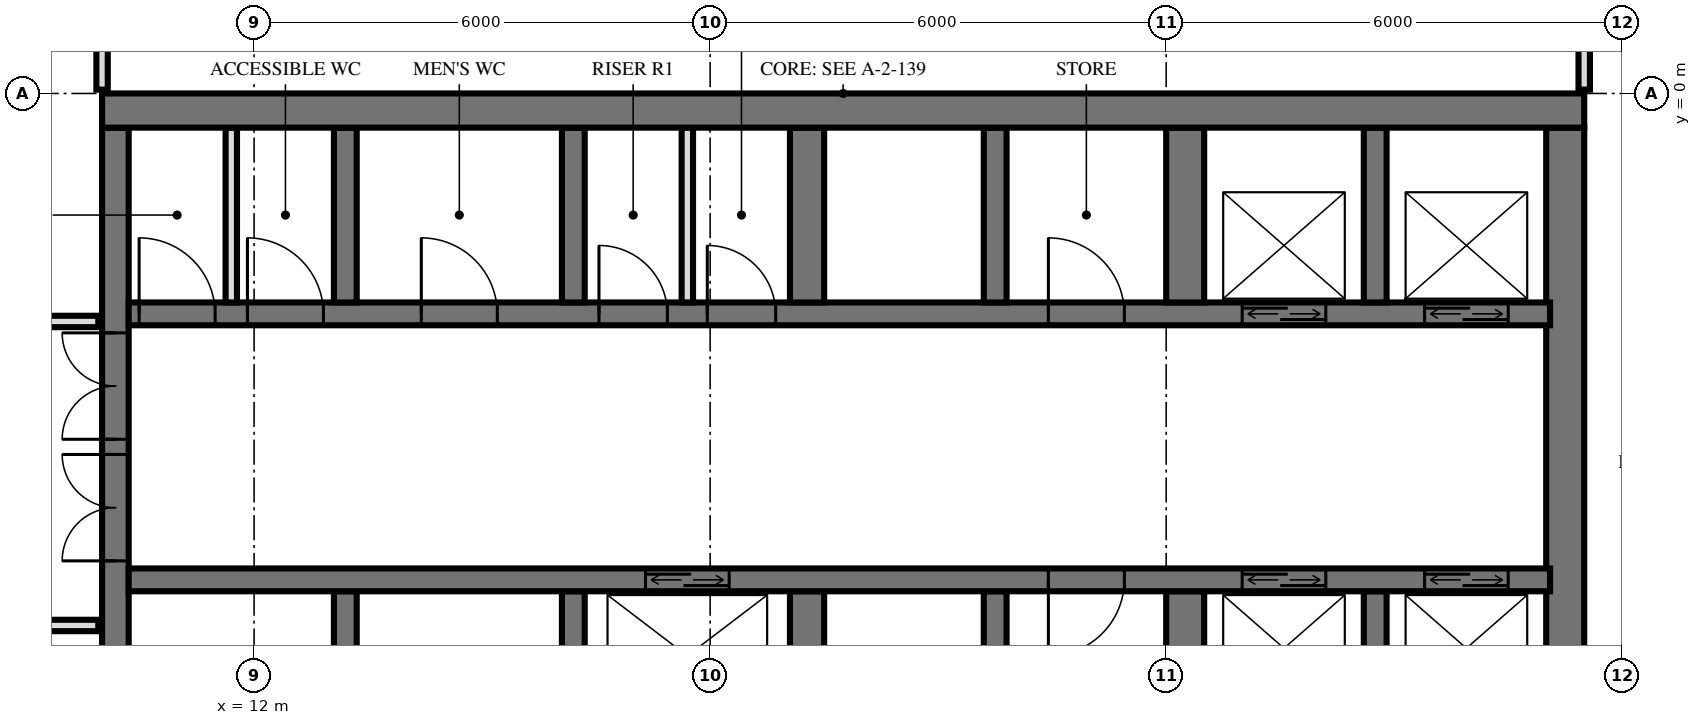
"""IFC4 building model, lengths in metres.
Left out: names, types, materials, properties, quantities, classifications, styles, units other than length and angle.
Written with IfcOpenShell. Run it as: python <this file> out.ifc"""

import sys

from ifc_helpers import new_model, si_unit, direction, frame, frame_2d, origin, place, context, subcontext, project, spatial, rectangle, extrude, element, fill, save


model = new_model("IFC4")
c1 = context("Model", 3, precision=1e-05, world=origin(), true_north=direction((0.0, 1.0)))
c2 = subcontext(c1, "Body", "Model", "MODEL_VIEW")
j1 = project(units=[si_unit("LENGTHUNIT", "METRE"), si_unit("PLANEANGLEUNIT", "RADIAN")], contexts=[c1])
p1 = place(None, origin())
s1 = spatial("IfcSite", under=j1, at=p1, CompositionType="ELEMENT")
p2 = place(p1, origin())
s2 = spatial("IfcBuilding", under=s1, at=p2, CompositionType="ELEMENT")
p3 = place(p2, frame((0.0, 0.0, 63.6)))
s3 = spatial("IfcBuildingStorey", under=s2, at=p3, CompositionType="ELEMENT", Elevation=63.6)
p4 = place(p3, frame((10.0, -0.225, 0.0), z_axis=(0.0, 0.0, 1.0), x_axis=(1.0, 0.0, 0.0)))
e1 = element("IfcWall", 1, at=p4, inside=s3, PredefinedType="SHEAR", context=c2, shape_type="SweptSolid", body=[
    extrude(rectangle(XDim=19.5, YDim=0.45, at=frame_2d((9.75, 0.0))), origin(), (0.0, 0.0, 1.0), 3.6),
])
p5 = place(p3, frame((10.175, -14.55, 0.0), z_axis=(0.0, 0.0, 1.0), x_axis=(0.0, 1.0, 0.0)))
e2 = element("IfcWall", 2, at=p5, inside=s3, PredefinedType="SHEAR", context=c2, shape_type="SweptSolid", body=[
    extrude(rectangle(XDim=14.1, YDim=0.35, at=frame_2d((7.05, 0.0))), origin(), (0.0, 0.0, 1.0), 3.6),
])
p6 = place(p5, frame((8.4, 0.0, 0.0)))
e3 = element("IfcOpeningElement", 3, at=p6, cuts=e2, PredefinedType="OPENING", context=c2, shape_type="SweptSolid", body=[
    extrude(rectangle(XDim=1.4, YDim=2.4, at=frame_2d((0.7, 1.2))), frame((0.0, 0.185, 0.0), z_axis=(0.0, -1.0, 0.0), x_axis=(1.0, 0.0, 0.0)), (0.0, 0.0, 1.0), 0.37),
])
p7 = place(p5, frame((10.0, 0.0, 0.0)))
e4 = element("IfcOpeningElement", 4, at=p7, cuts=e2, PredefinedType="OPENING", context=c2, shape_type="SweptSolid", body=[
    extrude(rectangle(XDim=1.4, YDim=2.4, at=frame_2d((0.7, 1.2))), frame((0.0, 0.185, 0.0), z_axis=(0.0, -1.0, 0.0), x_axis=(1.0, 0.0, 0.0)), (0.0, 0.0, 1.0), 0.37),
])
p8 = place(p5, frame((4.0, 0.0, 0.0)))
e5 = element("IfcOpeningElement", 5, at=p8, cuts=e2, PredefinedType="OPENING", context=c2, shape_type="SweptSolid", body=[
    extrude(rectangle(XDim=1.2, YDim=2.1, at=frame_2d((0.6, 1.05))), frame((0.0, 0.185, 0.0), z_axis=(0.0, -1.0, 0.0), x_axis=(1.0, 0.0, 0.0)), (0.0, 0.0, 1.0), 0.37),
])
p9 = place(p3, frame((29.25, -14.55, 0.0), z_axis=(0.0, 0.0, 1.0), x_axis=(0.0, 1.0, 0.0)))
e6 = element("IfcWall", 6, at=p9, inside=s3, PredefinedType="SHEAR", context=c2, shape_type="SweptSolid", body=[
    extrude(rectangle(XDim=14.1, YDim=0.5, at=frame_2d((7.05, 0.0))), origin(), (0.0, 0.0, 1.0), 3.6),
])
p10 = place(p3, frame((10.35, -2.9, 0.0), z_axis=(0.0, 0.0, 1.0), x_axis=(1.0, 0.0, 0.0)))
e7 = element("IfcWall", 7, at=p10, inside=s3, PredefinedType="SHEAR", context=c2, shape_type="SweptSolid", body=[
    extrude(rectangle(XDim=18.7, YDim=0.3, at=frame_2d((9.35, 0.0))), origin(), (0.0, 0.0, 1.0), 3.6),
])
p11 = place(p10, frame((14.65, 0.0, 0.0)))
e8 = element("IfcOpeningElement", 8, at=p11, cuts=e7, PredefinedType="OPENING", context=c2, shape_type="SweptSolid", body=[
    extrude(rectangle(XDim=1.1, YDim=2.1, at=frame_2d((0.55, 1.05))), frame((0.0, 0.16, 0.0), z_axis=(0.0, -1.0, 0.0), x_axis=(1.0, 0.0, 0.0)), (0.0, 0.0, 1.0), 0.32),
])
p12 = place(p10, frame((17.05, 0.0, 0.0)))
e9 = element("IfcOpeningElement", 9, at=p12, cuts=e7, PredefinedType="OPENING", context=c2, shape_type="SweptSolid", body=[
    extrude(rectangle(XDim=1.1, YDim=2.1, at=frame_2d((0.55, 1.05))), frame((0.0, 0.16, 0.0), z_axis=(0.0, -1.0, 0.0), x_axis=(1.0, 0.0, 0.0)), (0.0, 0.0, 1.0), 0.32),
])
p13 = place(p10, frame((6.188, 0.0, 0.0)))
e10 = element("IfcOpeningElement", 10, at=p13, cuts=e7, PredefinedType="OPENING", context=c2, shape_type="SweptSolid", body=[
    extrude(rectangle(XDim=0.9, YDim=2.1, at=frame_2d((0.45, 1.05))), frame((0.0, 0.16, 0.0), z_axis=(0.0, -1.0, 0.0), x_axis=(1.0, 0.0, 0.0)), (0.0, 0.0, 1.0), 0.32),
])
p14 = place(p10, frame((7.613, 0.0, 0.0)))
e11 = element("IfcOpeningElement", 11, at=p14, cuts=e7, PredefinedType="OPENING", context=c2, shape_type="SweptSolid", body=[
    extrude(rectangle(XDim=0.9, YDim=2.1, at=frame_2d((0.45, 1.05))), frame((0.0, 0.16, 0.0), z_axis=(0.0, -1.0, 0.0), x_axis=(1.0, 0.0, 0.0)), (0.0, 0.0, 1.0), 0.32),
])
p15 = place(p10, frame((0.137, 0.0, 0.0)))
e12 = element("IfcOpeningElement", 12, at=p15, cuts=e7, PredefinedType="OPENING", context=c2, shape_type="SweptSolid", body=[
    extrude(rectangle(XDim=1.0, YDim=2.1, at=frame_2d((0.5, 1.05))), frame((0.0, 0.16, 0.0), z_axis=(0.0, -1.0, 0.0), x_axis=(1.0, 0.0, 0.0)), (0.0, 0.0, 1.0), 0.32),
])
p16 = place(p10, frame((1.562, 0.0, 0.0)))
e13 = element("IfcOpeningElement", 13, at=p16, cuts=e7, PredefinedType="OPENING", context=c2, shape_type="SweptSolid", body=[
    extrude(rectangle(XDim=1.0, YDim=2.1, at=frame_2d((0.5, 1.05))), frame((0.0, 0.16, 0.0), z_axis=(0.0, -1.0, 0.0), x_axis=(1.0, 0.0, 0.0)), (0.0, 0.0, 1.0), 0.32),
])
p17 = place(p10, frame((3.85, 0.0, 0.0)))
e14 = element("IfcOpeningElement", 14, at=p17, cuts=e7, PredefinedType="OPENING", context=c2, shape_type="SweptSolid", body=[
    extrude(rectangle(XDim=1.0, YDim=2.1, at=frame_2d((0.5, 1.05))), frame((0.0, 0.16, 0.0), z_axis=(0.0, -1.0, 0.0), x_axis=(1.0, 0.0, 0.0)), (0.0, 0.0, 1.0), 0.32),
])
p18 = place(p10, frame((12.1, 0.0, 0.0)))
e15 = element("IfcOpeningElement", 15, at=p18, cuts=e7, PredefinedType="OPENING", context=c2, shape_type="SweptSolid", body=[
    extrude(rectangle(XDim=1.0, YDim=2.1, at=frame_2d((0.5, 1.05))), frame((0.0, 0.16, 0.0), z_axis=(0.0, -1.0, 0.0), x_axis=(1.0, 0.0, 0.0)), (0.0, 0.0, 1.0), 0.32),
])
p19 = place(p3, frame((10.35, -6.4, 0.0), z_axis=(0.0, 0.0, 1.0), x_axis=(1.0, 0.0, 0.0)))
e16 = element("IfcWall", 16, at=p19, inside=s3, PredefinedType="SHEAR", context=c2, shape_type="SweptSolid", body=[
    extrude(rectangle(XDim=18.7, YDim=0.3, at=frame_2d((9.35, 0.0))), origin(), (0.0, 0.0, 1.0), 3.6),
])
p20 = place(p19, frame((14.65, 0.0, 0.0)))
e17 = element("IfcOpeningElement", 17, at=p20, cuts=e16, PredefinedType="OPENING", context=c2, shape_type="SweptSolid", body=[
    extrude(rectangle(XDim=1.1, YDim=2.1, at=frame_2d((0.55, 1.05))), frame((0.0, 0.16, 0.0), z_axis=(0.0, -1.0, 0.0), x_axis=(1.0, 0.0, 0.0)), (0.0, 0.0, 1.0), 0.32),
])
p21 = place(p19, frame((17.05, 0.0, 0.0)))
e18 = element("IfcOpeningElement", 18, at=p21, cuts=e16, PredefinedType="OPENING", context=c2, shape_type="SweptSolid", body=[
    extrude(rectangle(XDim=1.1, YDim=2.1, at=frame_2d((0.55, 1.05))), frame((0.0, 0.16, 0.0), z_axis=(0.0, -1.0, 0.0), x_axis=(1.0, 0.0, 0.0)), (0.0, 0.0, 1.0), 0.32),
])
p22 = place(p19, frame((6.8, 0.0, 0.0)))
e19 = element("IfcOpeningElement", 19, at=p22, cuts=e16, PredefinedType="OPENING", context=c2, shape_type="SweptSolid", body=[
    extrude(rectangle(XDim=1.1, YDim=2.1, at=frame_2d((0.55, 1.05))), frame((0.0, 0.16, 0.0), z_axis=(0.0, -1.0, 0.0), x_axis=(1.0, 0.0, 0.0)), (0.0, 0.0, 1.0), 0.32),
])
p23 = place(p19, frame((12.1, 0.0, 0.0)))
e20 = element("IfcOpeningElement", 20, at=p23, cuts=e16, PredefinedType="OPENING", context=c2, shape_type="SweptSolid", body=[
    extrude(rectangle(XDim=1.0, YDim=2.1, at=frame_2d((0.5, 1.05))), frame((0.0, 0.16, 0.0), z_axis=(0.0, -1.0, 0.0), x_axis=(1.0, 0.0, 0.0)), (0.0, 0.0, 1.0), 0.32),
])
for number, where, z_axis, x_axis in (
    (21, (13.2, -2.75, 0.0), (0.0, 0.0, 1.0), (0.0, 1.0, 0.0)),
    (22, (13.2, -8.85, 0.0), (0.0, 0.0, 1.0), (0.0, 1.0, 0.0)),
    (23, (16.2, -2.75, 0.0), (0.0, 0.0, 1.0), (0.0, 1.0, 0.0)),
    (24, (16.2, -8.85, 0.0), (0.0, 0.0, 1.0), (0.0, 1.0, 0.0)),
):
    element("IfcWall", number, at=place(p3, frame(where, z_axis=z_axis, x_axis=x_axis)), inside=s3, PredefinedType="SHEAR", context=c2, shape_type="SweptSolid", body=[
        extrude(rectangle(XDim=2.3, YDim=0.3, at=frame_2d((1.15, 0.0))), origin(), (0.0, 0.0, 1.0), 3.6),
    ])
for number, where, z_axis, x_axis in (
    (25, (19.275, -2.75, 0.0), (0.0, 0.0, 1.0), (0.0, 1.0, 0.0)),
    (26, (19.275, -8.85, 0.0), (0.0, 0.0, 1.0), (0.0, 1.0, 0.0)),
):
    element("IfcWall", number, at=place(p3, frame(where, z_axis=z_axis, x_axis=x_axis)), inside=s3, PredefinedType="SHEAR", context=c2, shape_type="SweptSolid", body=[
        extrude(rectangle(XDim=2.3, YDim=0.45, at=frame_2d((1.15, 0.0))), origin(), (0.0, 0.0, 1.0), 3.6),
    ])
for number, where, z_axis, x_axis in (
    (27, (21.75, -2.75, 0.0), (0.0, 0.0, 1.0), (0.0, 1.0, 0.0)),
    (28, (21.75, -8.85, 0.0), (0.0, 0.0, 1.0), (0.0, 1.0, 0.0)),
):
    element("IfcWall", number, at=place(p3, frame(where, z_axis=z_axis, x_axis=x_axis)), inside=s3, PredefinedType="SHEAR", context=c2, shape_type="SweptSolid", body=[
        extrude(rectangle(XDim=2.3, YDim=0.3, at=frame_2d((1.15, 0.0))), origin(), (0.0, 0.0, 1.0), 3.6),
    ])
for number, where, z_axis, x_axis in (
    (29, (24.25, -2.75, 0.0), (0.0, 0.0, 1.0), (0.0, 1.0, 0.0)),
    (30, (24.25, -8.85, 0.0), (0.0, 0.0, 1.0), (0.0, 1.0, 0.0)),
):
    element("IfcWall", number, at=place(p3, frame(where, z_axis=z_axis, x_axis=x_axis)), inside=s3, PredefinedType="SHEAR", context=c2, shape_type="SweptSolid", body=[
        extrude(rectangle(XDim=2.3, YDim=0.5, at=frame_2d((1.15, 0.0))), origin(), (0.0, 0.0, 1.0), 3.6),
    ])
for number, where, z_axis, x_axis in (
    (31, (26.75, -2.75, 0.0), (0.0, 0.0, 1.0), (0.0, 1.0, 0.0)),
    (32, (26.75, -8.85, 0.0), (0.0, 0.0, 1.0), (0.0, 1.0, 0.0)),
):
    element("IfcWall", number, at=place(p3, frame(where, z_axis=z_axis, x_axis=x_axis)), inside=s3, PredefinedType="SHEAR", context=c2, shape_type="SweptSolid", body=[
        extrude(rectangle(XDim=2.3, YDim=0.3, at=frame_2d((1.15, 0.0))), origin(), (0.0, 0.0, 1.0), 3.6),
    ])
for number, where, z_axis, x_axis in (
    (33, (17.7, -2.75, 0.0), (0.0, 0.0, 1.0), (0.0, 1.0, 0.0)),
    (34, (11.7, -2.75, 0.0), (0.0, 0.0, 1.0), (0.0, 1.0, 0.0)),
):
    element("IfcWall", number, at=place(p3, frame(where, z_axis=z_axis, x_axis=x_axis)), inside=s3, PredefinedType="PARTITIONING", context=c2, shape_type="SweptSolid", body=[
        extrude(rectangle(XDim=2.3, YDim=0.15, at=frame_2d((1.15, 0.0))), origin(), (0.0, 0.0, 1.0), 3.3),
    ])
p24 = place(p3, frame((29.5, 0.05, 0.0), z_axis=(0.0, 0.0, 1.0), x_axis=(0.0, 1.0, 0.0)))
e35 = element("IfcWall", 35, at=p24, inside=s3, PredefinedType="PARTITIONING", context=c2, shape_type="SweptSolid", body=[
    extrude(rectangle(XDim=0.827, YDim=0.15, at=frame_2d((0.414, 0.0))), origin(), (0.0, 0.0, 1.0), 3.32),
])
p25 = place(p3, frame((10.0, 0.05, 0.0), z_axis=(0.0, 0.0, 1.0), x_axis=(0.0, 1.0, 0.0)))
e36 = element("IfcWall", 36, at=p25, inside=s3, PredefinedType="PARTITIONING", context=c2, shape_type="SweptSolid", body=[
    extrude(rectangle(XDim=0.97, YDim=0.15, at=frame_2d((0.485, 0.0))), origin(), (0.0, 0.0, 1.0), 3.32),
])
p26 = place(p3, frame((-9.95, -7.0, 0.0), z_axis=(0.0, 0.0, 1.0), x_axis=(1.0, 0.0, 0.0)))
e37 = element("IfcWall", 37, at=p26, inside=s3, PredefinedType="PARTITIONING", context=c2, shape_type="SweptSolid", body=[
    extrude(rectangle(XDim=19.9, YDim=0.15, at=frame_2d((9.95, 0.0))), origin(), (0.0, 0.0, 1.0), 3.32),
])
p27 = place(p26, frame((9.45, 0.0, 0.0)))
e38 = element("IfcOpeningElement", 38, at=p27, cuts=e37, PredefinedType="OPENING", context=c2, shape_type="SweptSolid", body=[
    extrude(rectangle(XDim=1.0, YDim=2.1, at=frame_2d((0.5, 1.05))), frame((0.0, 0.085, 0.0), z_axis=(0.0, -1.0, 0.0), x_axis=(1.0, 0.0, 0.0)), (0.0, 0.0, 1.0), 0.17),
])
p28 = place(p26, frame((15.45, 0.0, 0.0)))
e39 = element("IfcOpeningElement", 39, at=p28, cuts=e37, PredefinedType="OPENING", context=c2, shape_type="SweptSolid", body=[
    extrude(rectangle(XDim=1.0, YDim=2.1, at=frame_2d((0.5, 1.05))), frame((0.0, 0.085, 0.0), z_axis=(0.0, -1.0, 0.0), x_axis=(1.0, 0.0, 0.0)), (0.0, 0.0, 1.0), 0.17),
])
p29 = place(p3, frame((-9.95, -3.0, 0.0), z_axis=(0.0, 0.0, 1.0), x_axis=(1.0, 0.0, 0.0)))
e40 = element("IfcWall", 40, at=p29, inside=s3, PredefinedType="PARTITIONING", context=c2, shape_type="SweptSolid", body=[
    extrude(rectangle(XDim=19.9, YDim=0.15, at=frame_2d((9.95, 0.0))), origin(), (0.0, 0.0, 1.0), 3.32),
])
p30 = place(p29, frame((0.95, 0.0, 0.0)))
e41 = element("IfcOpeningElement", 41, at=p30, cuts=e40, PredefinedType="OPENING", context=c2, shape_type="SweptSolid", body=[
    extrude(rectangle(XDim=1.0, YDim=2.1, at=frame_2d((0.5, 1.05))), frame((0.0, 0.085, 0.0), z_axis=(0.0, -1.0, 0.0), x_axis=(1.0, 0.0, 0.0)), (0.0, 0.0, 1.0), 0.17),
])
p31 = place(p29, frame((3.7, 0.0, 0.0)))
e42 = element("IfcOpeningElement", 42, at=p31, cuts=e40, PredefinedType="OPENING", context=c2, shape_type="SweptSolid", body=[
    extrude(rectangle(XDim=1.0, YDim=2.1, at=frame_2d((0.5, 1.05))), frame((0.0, 0.085, 0.0), z_axis=(0.0, -1.0, 0.0), x_axis=(1.0, 0.0, 0.0)), (0.0, 0.0, 1.0), 0.17),
])
p32 = place(p29, frame((7.95, 0.0, 0.0)))
e43 = element("IfcOpeningElement", 43, at=p32, cuts=e40, PredefinedType="OPENING", context=c2, shape_type="SweptSolid", body=[
    extrude(rectangle(XDim=1.0, YDim=2.1, at=frame_2d((0.5, 1.05))), frame((0.0, 0.085, 0.0), z_axis=(0.0, -1.0, 0.0), x_axis=(1.0, 0.0, 0.0)), (0.0, 0.0, 1.0), 0.17),
])
p33 = place(p29, frame((15.2, 0.0, 0.0)))
e44 = element("IfcOpeningElement", 44, at=p33, cuts=e40, PredefinedType="OPENING", context=c2, shape_type="SweptSolid", body=[
    extrude(rectangle(XDim=1.0, YDim=2.1, at=frame_2d((0.5, 1.05))), frame((0.0, 0.085, 0.0), z_axis=(0.0, -1.0, 0.0), x_axis=(1.0, 0.0, 0.0)), (0.0, 0.0, 1.0), 0.17),
])
p34 = place(p11, origin())
e45 = element("IfcDoor", 45, at=p34, inside=s3, OperationType="DOUBLE_DOOR_SLIDING", PredefinedType="USERDEFINED", context=c2, shape_type="SweptSolid", body=[
    extrude(rectangle(XDim=1.1, YDim=2.1, at=frame_2d((0.55, 1.05))), frame((0.0, 0.025, 0.0), z_axis=(0.0, -1.0, 0.0), x_axis=(1.0, 0.0, 0.0)), (0.0, 0.0, 1.0), 0.05),
])
fill(e8, e45)
p35 = place(p12, origin())
e46 = element("IfcDoor", 46, at=p35, inside=s3, OperationType="DOUBLE_DOOR_SLIDING", PredefinedType="USERDEFINED", context=c2, shape_type="SweptSolid", body=[
    extrude(rectangle(XDim=1.1, YDim=2.1, at=frame_2d((0.55, 1.05))), frame((0.0, 0.025, 0.0), z_axis=(0.0, -1.0, 0.0), x_axis=(1.0, 0.0, 0.0)), (0.0, 0.0, 1.0), 0.05),
])
fill(e9, e46)
p36 = place(p20, origin())
e47 = element("IfcDoor", 47, at=p36, inside=s3, OperationType="DOUBLE_DOOR_SLIDING", PredefinedType="USERDEFINED", context=c2, shape_type="SweptSolid", body=[
    extrude(rectangle(XDim=1.1, YDim=2.1, at=frame_2d((0.55, 1.05))), frame((0.0, 0.025, 0.0), z_axis=(0.0, -1.0, 0.0), x_axis=(1.0, 0.0, 0.0)), (0.0, 0.0, 1.0), 0.05),
])
fill(e17, e47)
p37 = place(p21, origin())
e48 = element("IfcDoor", 48, at=p37, inside=s3, OperationType="DOUBLE_DOOR_SLIDING", PredefinedType="USERDEFINED", context=c2, shape_type="SweptSolid", body=[
    extrude(rectangle(XDim=1.1, YDim=2.1, at=frame_2d((0.55, 1.05))), frame((0.0, 0.025, 0.0), z_axis=(0.0, -1.0, 0.0), x_axis=(1.0, 0.0, 0.0)), (0.0, 0.0, 1.0), 0.05),
])
fill(e18, e48)
p38 = place(p22, origin())
e49 = element("IfcDoor", 49, at=p38, inside=s3, OperationType="DOUBLE_DOOR_SLIDING", PredefinedType="USERDEFINED", context=c2, shape_type="SweptSolid", body=[
    extrude(rectangle(XDim=1.1, YDim=2.1, at=frame_2d((0.55, 1.05))), frame((0.0, 0.025, 0.0), z_axis=(0.0, -1.0, 0.0), x_axis=(1.0, 0.0, 0.0)), (0.0, 0.0, 1.0), 0.05),
])
fill(e19, e49)
p39 = place(p6, origin())
e50 = element("IfcDoor", 50, at=p39, inside=s3, OperationType="DOUBLE_DOOR_SINGLE_SWING", PredefinedType="DOOR", context=c2, shape_type="SweptSolid", body=[
    extrude(rectangle(XDim=1.4, YDim=2.4, at=frame_2d((0.7, 1.2))), frame((0.0, 0.025, 0.0), z_axis=(0.0, -1.0, 0.0), x_axis=(1.0, 0.0, 0.0)), (0.0, 0.0, 1.0), 0.05),
])
fill(e3, e50)
p40 = place(p7, origin())
e51 = element("IfcDoor", 51, at=p40, inside=s3, OperationType="DOUBLE_DOOR_SINGLE_SWING", PredefinedType="DOOR", context=c2, shape_type="SweptSolid", body=[
    extrude(rectangle(XDim=1.4, YDim=2.4, at=frame_2d((0.7, 1.2))), frame((0.0, 0.025, 0.0), z_axis=(0.0, -1.0, 0.0), x_axis=(1.0, 0.0, 0.0)), (0.0, 0.0, 1.0), 0.05),
])
fill(e4, e51)
p41 = place(p13, origin())
e52 = element("IfcDoor", 52, at=p41, inside=s3, OperationType="SINGLE_SWING_RIGHT", PredefinedType="DOOR", context=c2, shape_type="SweptSolid", body=[
    extrude(rectangle(XDim=0.9, YDim=2.1, at=frame_2d((0.45, 1.05))), frame((0.0, 0.025, 0.0), z_axis=(0.0, -1.0, 0.0), x_axis=(1.0, 0.0, 0.0)), (0.0, 0.0, 1.0), 0.05),
])
fill(e10, e52)
p42 = place(p14, origin())
e53 = element("IfcDoor", 53, at=p42, inside=s3, OperationType="SINGLE_SWING_RIGHT", PredefinedType="DOOR", context=c2, shape_type="SweptSolid", body=[
    extrude(rectangle(XDim=0.9, YDim=2.1, at=frame_2d((0.45, 1.05))), frame((0.0, 0.025, 0.0), z_axis=(0.0, -1.0, 0.0), x_axis=(1.0, 0.0, 0.0)), (0.0, 0.0, 1.0), 0.05),
])
fill(e11, e53)
p43 = place(p15, origin())
e54 = element("IfcDoor", 54, at=p43, inside=s3, OperationType="SINGLE_SWING_RIGHT", PredefinedType="DOOR", context=c2, shape_type="SweptSolid", body=[
    extrude(rectangle(XDim=1.0, YDim=2.1, at=frame_2d((0.5, 1.05))), frame((0.0, 0.025, 0.0), z_axis=(0.0, -1.0, 0.0), x_axis=(1.0, 0.0, 0.0)), (0.0, 0.0, 1.0), 0.05),
])
fill(e12, e54)
p44 = place(p16, origin())
e55 = element("IfcDoor", 55, at=p44, inside=s3, OperationType="SINGLE_SWING_RIGHT", PredefinedType="DOOR", context=c2, shape_type="SweptSolid", body=[
    extrude(rectangle(XDim=1.0, YDim=2.1, at=frame_2d((0.5, 1.05))), frame((0.0, 0.025, 0.0), z_axis=(0.0, -1.0, 0.0), x_axis=(1.0, 0.0, 0.0)), (0.0, 0.0, 1.0), 0.05),
])
fill(e13, e55)
p45 = place(p17, origin())
e56 = element("IfcDoor", 56, at=p45, inside=s3, OperationType="SINGLE_SWING_RIGHT", PredefinedType="DOOR", context=c2, shape_type="SweptSolid", body=[
    extrude(rectangle(XDim=1.0, YDim=2.1, at=frame_2d((0.5, 1.05))), frame((0.0, 0.025, 0.0), z_axis=(0.0, -1.0, 0.0), x_axis=(1.0, 0.0, 0.0)), (0.0, 0.0, 1.0), 0.05),
])
fill(e14, e56)
p46 = place(p18, origin())
e57 = element("IfcDoor", 57, at=p46, inside=s3, OperationType="SINGLE_SWING_RIGHT", PredefinedType="DOOR", context=c2, shape_type="SweptSolid", body=[
    extrude(rectangle(XDim=1.0, YDim=2.1, at=frame_2d((0.5, 1.05))), frame((0.0, 0.025, 0.0), z_axis=(0.0, -1.0, 0.0), x_axis=(1.0, 0.0, 0.0)), (0.0, 0.0, 1.0), 0.05),
])
fill(e15, e57)
p47 = place(p23, frame((0.5, 0.0, 0.0), z_axis=(0.0, 0.0, 1.0), x_axis=(-1.0, 0.0, 0.0)))
e58 = element("IfcDoor", 58, at=p47, inside=s3, OperationType="SINGLE_SWING_LEFT", PredefinedType="DOOR", context=c2, shape_type="SweptSolid", body=[
    extrude(rectangle(XDim=1.0, YDim=2.1, at=frame_2d((0.0, 1.05))), frame((0.0, -0.025, 0.0), z_axis=(0.0, 1.0, 0.0), x_axis=(-1.0, 0.0, 0.0)), (0.0, 0.0, 1.0), 0.05),
])
fill(e20, e58)
save(model, sys.argv[1])
